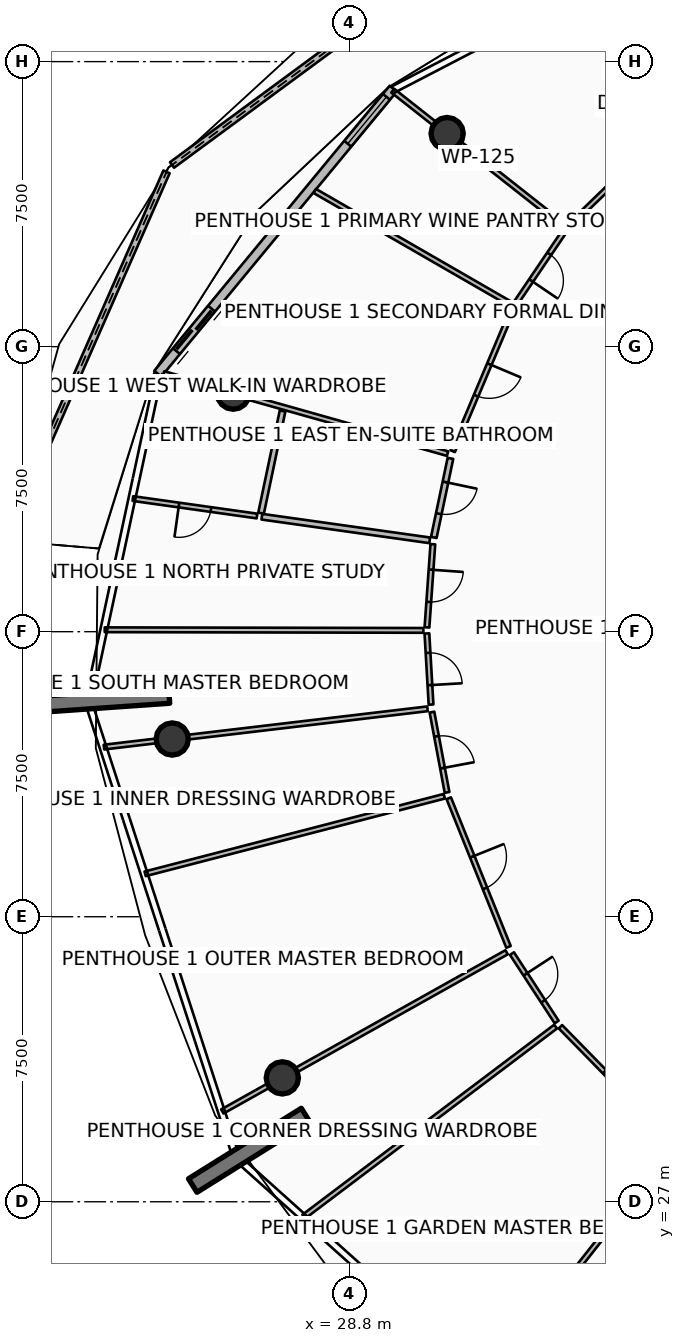
"""IFC4 building model, lengths in metres.
Left out: names, types, materials, properties, quantities, classifications, styles, units other than length and angle.
Written with IfcOpenShell. Run it as: python <this file> out.ifc"""

import sys

from ifc_helpers import new_model, si_unit, direction, frame, frame_2d, origin, origin_2d, place, context, subcontext, project, spatial, polyline, rectangle, circle, outline, extrude, element, fill, save


model = new_model("IFC4")
c1 = context("Model", 3, precision=1e-05, world=origin(), true_north=direction((0.0, 1.0)))
c2 = subcontext(c1, "Body", "Model", "MODEL_VIEW")
j1 = project(units=[si_unit("LENGTHUNIT", "METRE"), si_unit("PLANEANGLEUNIT", "RADIAN")], contexts=[c1])
p1 = place(None, origin())
s1 = spatial("IfcSite", under=j1, at=p1, CompositionType="ELEMENT")
p2 = place(p1, origin())
s2 = spatial("IfcBuilding", under=s1, at=p2, CompositionType="ELEMENT")
p3 = place(p2, frame((0.0, 0.0, 326.3)))
s3 = spatial("IfcBuildingStorey", under=s2, at=p3, CompositionType="ELEMENT", Elevation=326.3)
for number, where, z_axis, x_axis in (
    (1, (24.059, 40.326, 0.0), (0.0, 0.0, 1.0), (-0.998, -0.07, 0.0)),
    (2, (27.647, 29.282, 0.0), (0.0, 0.0, 1.0), (-0.848, -0.53, 0.0)),
):
    element("IfcWall", number, at=place(p3, frame(where, z_axis=z_axis, x_axis=x_axis)), inside=s3, PredefinedType="SOLIDWALL", context=c2, shape_type="SweptSolid", body=[
        extrude(rectangle(XDim=3.5, YDim=0.42, at=frame_2d((1.75, 0.0))), origin(), (0.0, 0.0, 1.0), 4.2),
    ])
for number, where, z_axis, x_axis in (
    (3, (31.374, 55.107, 0.0), (0.0, 0.0, 1.0), (1.0, 0.0, 0.0)),
    (4, (25.744, 48.277, 0.0), (0.0, 0.0, 1.0), (1.0, 0.0, 0.0)),
    (5, (24.14, 39.176, 0.0), (0.0, 0.0, 1.0), (1.0, 0.0, 0.0)),
    (6, (27.037, 30.26, 0.0), (0.0, 0.0, 1.0), (1.0, 0.0, 0.0)),
):
    element("IfcColumn", number, at=place(p3, frame(where, z_axis=z_axis, x_axis=x_axis)), inside=s3, PredefinedType="COLUMN", context=c2, shape_type="SweptSolid", body=[
        extrude(circle(Radius=0.425, at=origin_2d()), origin(), (0.0, 0.0, 1.0), 3.94),
    ])
p4 = place(p3, frame((32.227, 60.241, 0.0), z_axis=(0.0, 0.0, 1.0), x_axis=(-0.805132760075, -0.593094628752, 0.0)))
e7 = element("IfcWall", 7, at=p4, inside=s3, PredefinedType="PARAPET", context=c2, shape_type="SweptSolid", body=[
    extrude(outline(polyline([(0.0, 0.0), (10.051, 0.0), (10.051, 1.832), (5.025, 1.696), (0.0, 1.497), (0.0, 0.0)])), frame((0.0, 0.09, 0.0), z_axis=(0.0, -1.0, 0.0), x_axis=(1.0, 0.0, 0.0)), (0.0, 0.0, 1.0), 0.18),
])
p5 = place(p3, frame((23.99, 54.1, 0.0), z_axis=(0.0, 0.0, 1.0), x_axis=(-0.402276040411, -0.915518425435, 0.0)))
e8 = element("IfcWall", 8, at=p5, inside=s3, PredefinedType="PARAPET", context=c2, shape_type="SweptSolid", body=[
    extrude(outline(polyline([(0.0, 0.0), (10.596, 0.0), (10.596, 1.756), (5.298, 1.853), (0.0, 1.832), (0.0, 0.0)])), frame((0.0, 0.09, 0.0), z_axis=(0.0, -1.0, 0.0), x_axis=(1.0, 0.0, 0.0)), (0.0, 0.0, 1.0), 0.18),
])
p6 = place(p3, frame((29.955, 56.289, 0.0), z_axis=(0.0, 0.0, 1.0), x_axis=(-0.636803612721, -0.771026042897, 0.0)))
e9 = element("IfcWall", 9, at=p6, inside=s3, PredefinedType="SOLIDWALL", context=c2, shape_type="SweptSolid", body=[
    extrude(rectangle(XDim=9.728, YDim=0.24, at=frame_2d((4.864, 0.0))), origin(), (0.0, 0.0, 1.0), 2.89),
])
p7 = place(p6, frame((7.508, 0.0, 0.0)))
e10 = element("IfcOpeningElement", 10, at=p7, cuts=e9, PredefinedType="OPENING", context=c2, shape_type="SweptSolid", body=[
    extrude(rectangle(XDim=1.45, YDim=2.15, at=frame_2d((0.725, 1.075))), frame((0.0, 0.13, 0.0), z_axis=(0.0, -1.0, 0.0), x_axis=(1.0, 0.0, 0.0)), (0.0, 0.0, 1.0), 0.26),
])
p8 = place(p6, frame((0.28, 0.0, 0.65)))
e11 = element("IfcOpeningElement", 11, at=p8, cuts=e9, PredefinedType="OPENING", context=c2, shape_type="SweptSolid", body=[
    extrude(rectangle(XDim=1.6, YDim=1.5, at=frame_2d((0.8, 0.75))), frame((0.0, 0.13, 0.0), z_axis=(0.0, -1.0, 0.0), x_axis=(1.0, 0.0, 0.0)), (0.0, 0.0, 1.0), 0.26),
])
p9 = place(p3, frame((37.76, 55.886, 0.0), z_axis=(0.0, 0.0, 1.0), x_axis=(-0.593476725003, 0.804851152002, 0.0)))
e12 = element("IfcWall", 12, at=p9, inside=s3, PredefinedType="PARTITIONING", context=c2, shape_type="SweptSolid", body=[
    extrude(rectangle(XDim=3.958, YDim=0.15, at=frame_2d((1.979, 0.0))), origin(), (0.0, 0.0, 1.0), 3.38),
])
p10 = place(p3, frame((37.749, 55.751, 0.0), z_axis=(0.0, 0.0, 1.0), x_axis=(-0.718380815069, -0.695650058967, 0.0)))
e13 = element("IfcWall", 13, at=p10, inside=s3, PredefinedType="PARTITIONING", context=c2, shape_type="SweptSolid", body=[
    extrude(rectangle(XDim=4.393, YDim=0.125, at=frame_2d((2.196, 0.0))), origin(), (0.0, 0.0, 1.0), 3.38),
])
p11 = place(p10, frame((1.746, 0.0, 0.0)))
e14 = element("IfcOpeningElement", 14, at=p11, cuts=e13, PredefinedType="OPENING", context=c2, shape_type="SweptSolid", body=[
    extrude(rectangle(XDim=0.9, YDim=2.08, at=frame_2d((0.45, 1.04))), frame((0.0, 0.073, 0.0), z_axis=(0.0, -1.0, 0.0), x_axis=(1.0, 0.0, 0.0)), (0.0, 0.0, 1.0), 0.145),
])
p12 = place(p3, frame((34.443, 52.688, 0.0), z_axis=(0.0, 0.0, 1.0), x_axis=(-0.785329715116, 0.61907773224, 0.0)))
e15 = element("IfcWall", 15, at=p12, inside=s3, PredefinedType="PARTITIONING", context=c2, shape_type="SweptSolid", body=[
    extrude(rectangle(XDim=5.73, YDim=0.125, at=frame_2d((2.865, 0.0))), origin(), (0.0, 0.0, 1.0), 3.38),
])
p13 = place(p3, frame((33.054, 50.619, 0.0), z_axis=(0.0, 0.0, 1.0), x_axis=(-0.86627763932, 0.499562860524, 0.0)))
e16 = element("IfcWall", 16, at=p13, inside=s3, PredefinedType="PARTITIONING", context=c2, shape_type="SweptSolid", body=[
    extrude(rectangle(XDim=5.96, YDim=0.125, at=frame_2d((2.98, 0.0))), origin(), (0.0, 0.0, 1.0), 3.38),
])
p14 = place(p3, frame((34.466, 52.543, 0.0), z_axis=(0.0, 0.0, 1.0), x_axis=(-0.560789421623, -0.827958467917, 0.0)))
e17 = element("IfcWall", 17, at=p14, inside=s3, PredefinedType="PARTITIONING", context=c2, shape_type="SweptSolid", body=[
    extrude(rectangle(XDim=2.298, YDim=0.125, at=frame_2d((1.149, 0.0))), origin(), (0.0, 0.0, 1.0), 3.38),
])
p15 = place(p14, frame((0.724, 0.0, 0.0)))
e18 = element("IfcOpeningElement", 18, at=p15, cuts=e17, PredefinedType="OPENING", context=c2, shape_type="SweptSolid", body=[
    extrude(rectangle(XDim=0.85, YDim=2.06, at=frame_2d((0.425, 1.03))), frame((0.0, 0.073, 0.0), z_axis=(0.0, -1.0, 0.0), x_axis=(1.0, 0.0, 0.0)), (0.0, 0.0, 1.0), 0.145),
])
p16 = place(p3, frame((33.101, 50.5, 0.0), z_axis=(0.0, 0.0, 1.0), x_axis=(-0.388459336045, -0.921465867105, 0.0)))
e19 = element("IfcWall", 19, at=p16, inside=s3, PredefinedType="PARTITIONING", context=c2, shape_type="SweptSolid", body=[
    extrude(rectangle(XDim=4.069, YDim=0.125, at=frame_2d((2.034, 0.0))), origin(), (0.0, 0.0, 1.0), 3.38),
])
p17 = place(p16, frame((1.584, 0.0, 0.0)))
e20 = element("IfcOpeningElement", 20, at=p17, cuts=e19, PredefinedType="OPENING", context=c2, shape_type="SweptSolid", body=[
    extrude(rectangle(XDim=0.9, YDim=2.08, at=frame_2d((0.45, 1.04))), frame((0.0, 0.073, 0.0), z_axis=(0.0, -1.0, 0.0), x_axis=(1.0, 0.0, 0.0)), (0.0, 0.0, 1.0), 0.145),
])
p18 = place(p3, frame((31.385, 46.686, 0.0), z_axis=(0.0, 0.0, 1.0), x_axis=(-0.962455784847, 0.271438505401, 0.0)))
e21 = element("IfcWall", 21, at=p18, inside=s3, PredefinedType="PARTITIONING", context=c2, shape_type="SweptSolid", body=[
    extrude(rectangle(XDim=7.764, YDim=0.125, at=frame_2d((3.882, 0.0))), origin(), (0.0, 0.0, 1.0), 3.38),
])
p19 = place(p3, frame((31.461, 46.561, 0.0), z_axis=(0.0, 0.0, 1.0), x_axis=(-0.20584268828, -0.978585094758, 0.0)))
e22 = element("IfcWall", 22, at=p19, inside=s3, PredefinedType="PARTITIONING", context=c2, shape_type="SweptSolid", body=[
    extrude(rectangle(XDim=2.127, YDim=0.15, at=frame_2d((1.063, 0.0))), origin(), (0.0, 0.0, 1.0), 3.38),
])
p20 = place(p19, frame((0.638, 0.0, 0.0)))
e23 = element("IfcOpeningElement", 23, at=p20, cuts=e22, PredefinedType="OPENING", context=c2, shape_type="SweptSolid", body=[
    extrude(rectangle(XDim=0.85, YDim=2.06, at=frame_2d((0.425, 1.03))), frame((0.0, 0.085, 0.0), z_axis=(0.0, -1.0, 0.0), x_axis=(1.0, 0.0, 0.0)), (0.0, 0.0, 1.0), 0.17),
])
p21 = place(p3, frame((27.043, 47.807, 0.0), z_axis=(0.0, 0.0, 1.0), x_axis=(-0.205902945386, -0.978572417903, 0.0)))
e24 = element("IfcWall", 24, at=p21, inside=s3, PredefinedType="PARTITIONING", context=c2, shape_type="SweptSolid", body=[
    extrude(rectangle(XDim=2.746, YDim=0.15, at=frame_2d((1.373, 0.0))), origin(), (0.0, 0.0, 1.0), 3.38),
])
p22 = place(p3, frame((30.915, 44.404, 0.0), z_axis=(0.0, 0.0, 1.0), x_axis=(-0.990240767804, 0.139367219172, 0.0)))
e25 = element("IfcWall", 25, at=p22, inside=s3, PredefinedType="PARTITIONING", context=c2, shape_type="SweptSolid", body=[
    extrude(rectangle(XDim=4.46, YDim=0.15, at=frame_2d((2.23, 0.0))), origin(), (0.0, 0.0, 1.0), 3.38),
])
p23 = place(p3, frame((26.37, 45.044, 0.0), z_axis=(0.0, 0.0, 1.0), x_axis=(-0.990243492516, 0.139347858002, 0.0)))
e26 = element("IfcWall", 26, at=p23, inside=s3, PredefinedType="PARTITIONING", context=c2, shape_type="SweptSolid", body=[
    extrude(rectangle(XDim=3.297, YDim=0.125, at=frame_2d((1.649, 0.0))), origin(), (0.0, 0.0, 1.0), 3.38),
])
p24 = place(p23, frame((1.224, 0.0, 0.0)))
e27 = element("IfcOpeningElement", 27, at=p24, cuts=e26, PredefinedType="OPENING", context=c2, shape_type="SweptSolid", body=[
    extrude(rectangle(XDim=0.85, YDim=2.06, at=frame_2d((0.425, 1.03))), frame((0.0, 0.073, 0.0), z_axis=(0.0, -1.0, 0.0), x_axis=(1.0, 0.0, 0.0)), (0.0, 0.0, 1.0), 0.145),
])
p25 = place(p3, frame((30.747, 42.034, 0.0), z_axis=(0.0, 0.0, 1.0), x_axis=(-0.999998039071, 0.001980367145, 0.0)))
e28 = element("IfcWall", 28, at=p25, inside=s3, PredefinedType="PARTITIONING", context=c2, shape_type="SweptSolid", body=[
    extrude(rectangle(XDim=8.383, YDim=0.125, at=frame_2d((4.191, 0.0))), origin(), (0.0, 0.0, 1.0), 3.38),
])
p26 = place(p3, frame((30.998, 44.302, 0.0), z_axis=(0.0, 0.0, 1.0), x_axis=(-0.070788273512, -0.997491363538, 0.0)))
e29 = element("IfcWall", 29, at=p26, inside=s3, PredefinedType="PARTITIONING", context=c2, shape_type="SweptSolid", body=[
    extrude(rectangle(XDim=2.194, YDim=0.125, at=frame_2d((1.097, 0.0))), origin(), (0.0, 0.0, 1.0), 3.38),
])
p27 = place(p26, frame((0.672, 0.0, 0.0)))
e30 = element("IfcOpeningElement", 30, at=p27, cuts=e29, PredefinedType="OPENING", context=c2, shape_type="SweptSolid", body=[
    extrude(rectangle(XDim=0.85, YDim=2.06, at=frame_2d((0.425, 1.03))), frame((0.0, 0.073, 0.0), z_axis=(0.0, -1.0, 0.0), x_axis=(1.0, 0.0, 0.0)), (0.0, 0.0, 1.0), 0.145),
])
p28 = place(p3, frame((30.842, 41.954, 0.0), z_axis=(0.0, 0.0, 1.0), x_axis=(0.057950971365, -0.998319430302, 0.0)))
e31 = element("IfcWall", 31, at=p28, inside=s3, PredefinedType="PARTITIONING", context=c2, shape_type="SweptSolid", body=[
    extrude(rectangle(XDim=1.875, YDim=0.125, at=frame_2d((0.938, 0.0))), origin(), (0.0, 0.0, 1.0), 3.38),
])
p29 = place(p28, frame((0.512, 0.0, 0.0)))
e32 = element("IfcOpeningElement", 32, at=p29, cuts=e31, PredefinedType="OPENING", context=c2, shape_type="SweptSolid", body=[
    extrude(rectangle(XDim=0.85, YDim=2.06, at=frame_2d((0.425, 1.03))), frame((0.0, 0.073, 0.0), z_axis=(0.0, -1.0, 0.0), x_axis=(1.0, 0.0, 0.0)), (0.0, 0.0, 1.0), 0.145),
])
p30 = place(p3, frame((30.857, 39.971, 0.0), z_axis=(0.0, 0.0, 1.0), x_axis=(-0.993069304007, -0.117530240533, 0.0)))
e33 = element("IfcWall", 33, at=p30, inside=s3, PredefinedType="PARTITIONING", context=c2, shape_type="SweptSolid", body=[
    extrude(rectangle(XDim=8.573, YDim=0.125, at=frame_2d((4.286, 0.0))), origin(), (0.0, 0.0, 1.0), 3.38),
])
p31 = place(p3, frame((31.299, 37.67, 0.0), z_axis=(0.0, 0.0, 1.0), x_axis=(-0.967993656755, -0.250974661037, 0.0)))
e34 = element("IfcWall", 34, at=p31, inside=s3, PredefinedType="PARTITIONING", context=c2, shape_type="SweptSolid", body=[
    extrude(rectangle(XDim=8.132, YDim=0.125, at=frame_2d((4.066, 0.0))), origin(), (0.0, 0.0, 1.0), 3.38),
])
p32 = place(p3, frame((30.975, 39.885, 0.0), z_axis=(0.0, 0.0, 1.0), x_axis=(0.184617579239, -0.982810434131, 0.0)))
e35 = element("IfcWall", 35, at=p32, inside=s3, PredefinedType="PARTITIONING", context=c2, shape_type="SweptSolid", body=[
    extrude(rectangle(XDim=2.15, YDim=0.125, at=frame_2d((1.075, 0.0))), origin(), (0.0, 0.0, 1.0), 3.38),
])
p33 = place(p32, frame((0.65, 0.0, 0.0)))
e36 = element("IfcOpeningElement", 36, at=p33, cuts=e35, PredefinedType="OPENING", context=c2, shape_type="SweptSolid", body=[
    extrude(rectangle(XDim=0.85, YDim=2.06, at=frame_2d((0.425, 1.03))), frame((0.0, 0.073, 0.0), z_axis=(0.0, -1.0, 0.0), x_axis=(1.0, 0.0, 0.0)), (0.0, 0.0, 1.0), 0.145),
])
p34 = place(p3, frame((31.416, 37.618, 0.0), z_axis=(0.0, 0.0, 1.0), x_axis=(0.37287786912, -0.927880431263, 0.0)))
e37 = element("IfcWall", 37, at=p34, inside=s3, PredefinedType="PARTITIONING", context=c2, shape_type="SweptSolid", body=[
    extrude(rectangle(XDim=4.216, YDim=0.125, at=frame_2d((2.108, 0.0))), origin(), (0.0, 0.0, 1.0), 3.38),
])
p35 = place(p34, frame((1.658, 0.0, 0.0)))
e38 = element("IfcOpeningElement", 38, at=p35, cuts=e37, PredefinedType="OPENING", context=c2, shape_type="SweptSolid", body=[
    extrude(rectangle(XDim=0.9, YDim=2.08, at=frame_2d((0.45, 1.04))), frame((0.0, 0.073, 0.0), z_axis=(0.0, -1.0, 0.0), x_axis=(1.0, 0.0, 0.0)), (0.0, 0.0, 1.0), 0.145),
])
p36 = place(p3, frame((32.938, 33.565, 0.0), z_axis=(0.0, 0.0, 1.0), x_axis=(-0.87250261652, -0.488609439293, 0.0)))
e39 = element("IfcWall", 39, at=p36, inside=s3, PredefinedType="PARTITIONING", context=c2, shape_type="SweptSolid", body=[
    extrude(rectangle(XDim=8.573, YDim=0.125, at=frame_2d((4.286, 0.0))), origin(), (0.0, 0.0, 1.0), 3.38),
])
p37 = place(p3, frame((37.312, 28.443, 0.0), z_axis=(0.0, 0.0, 1.0), x_axis=(-0.619079427556, -0.78532837869, 0.0)))
e40 = element("IfcWall", 40, at=p37, inside=s3, PredefinedType="PARTITIONING", context=c2, shape_type="SweptSolid", body=[
    extrude(rectangle(XDim=7.864, YDim=0.125, at=frame_2d((3.932, 0.0))), origin(), (0.0, 0.0, 1.0), 3.38),
])
p38 = place(p3, frame((34.228, 31.608, 0.0), z_axis=(0.0, 0.0, 1.0), x_axis=(-0.798277484709, -0.602289845014, 0.0)))
e41 = element("IfcWall", 41, at=p38, inside=s3, PredefinedType="PARTITIONING", context=c2, shape_type="SweptSolid", body=[
    extrude(rectangle(XDim=8.299, YDim=0.125, at=frame_2d((4.149, 0.0))), origin(), (0.0, 0.0, 1.0), 3.38),
])
p39 = place(p3, frame((33.08, 33.53, 0.0), z_axis=(0.0, 0.0, 1.0), x_axis=(0.546735291737, -0.837305512205, 0.0)))
e42 = element("IfcWall", 42, at=p39, inside=s3, PredefinedType="PARTITIONING", context=c2, shape_type="SweptSolid", body=[
    extrude(rectangle(XDim=2.15, YDim=0.125, at=frame_2d((1.075, 0.0))), origin(), (0.0, 0.0, 1.0), 3.38),
])
p40 = place(p39, frame((0.65, 0.0, 0.0)))
e43 = element("IfcOpeningElement", 43, at=p40, cuts=e42, PredefinedType="OPENING", context=c2, shape_type="SweptSolid", body=[
    extrude(rectangle(XDim=0.85, YDim=2.06, at=frame_2d((0.425, 1.03))), frame((0.0, 0.073, 0.0), z_axis=(0.0, -1.0, 0.0), x_axis=(1.0, 0.0, 0.0)), (0.0, 0.0, 1.0), 0.145),
])
p41 = place(p3, frame((34.355, 31.605, 0.0), z_axis=(0.0, 0.0, 1.0), x_axis=(0.699567507915, -0.714566513258, 0.0)))
e44 = element("IfcWall", 44, at=p41, inside=s3, PredefinedType="PARTITIONING", context=c2, shape_type="SweptSolid", body=[
    extrude(rectangle(XDim=4.216, YDim=0.125, at=frame_2d((2.108, 0.0))), origin(), (0.0, 0.0, 1.0), 3.38),
])
p42 = place(p41, frame((1.658, 0.0, 0.0)))
e45 = element("IfcOpeningElement", 45, at=p42, cuts=e44, PredefinedType="OPENING", context=c2, shape_type="SweptSolid", body=[
    extrude(rectangle(XDim=0.9, YDim=2.08, at=frame_2d((0.45, 1.04))), frame((0.0, 0.073, 0.0), z_axis=(0.0, -1.0, 0.0), x_axis=(1.0, 0.0, 0.0)), (0.0, 0.0, 1.0), 0.145),
])
p43 = place(p7, origin())
e46 = element("IfcDoor", 46, at=p43, inside=s3, OperationType="DOUBLE_DOOR_SLIDING", PredefinedType="DOOR", context=c2, shape_type="SweptSolid", body=[
    extrude(rectangle(XDim=1.45, YDim=2.15, at=frame_2d((0.725, 1.075))), frame((0.0, 0.025, 0.0), z_axis=(0.0, -1.0, 0.0), x_axis=(1.0, 0.0, 0.0)), (0.0, 0.0, 1.0), 0.05),
])
fill(e10, e46)
p44 = place(p8, origin())
e47 = element("IfcWindow", 47, at=p44, inside=s3, PartitioningType="SINGLE_PANEL", PredefinedType="WINDOW", context=c2, shape_type="SweptSolid", body=[
    extrude(rectangle(XDim=1.6, YDim=1.5, at=frame_2d((0.8, 0.75))), frame((0.0, 0.03, 0.0), z_axis=(0.0, -1.0, 0.0), x_axis=(1.0, 0.0, 0.0)), (0.0, 0.0, 1.0), 0.06),
])
fill(e11, e47)
p45 = place(p15, origin())
e48 = element("IfcDoor", 48, at=p45, inside=s3, OperationType="SINGLE_SWING_RIGHT", PredefinedType="DOOR", context=c2, shape_type="SweptSolid", body=[
    extrude(rectangle(XDim=0.85, YDim=2.06, at=frame_2d((0.425, 1.03))), frame((0.0, 0.025, 0.0), z_axis=(0.0, -1.0, 0.0), x_axis=(1.0, 0.0, 0.0)), (0.0, 0.0, 1.0), 0.05),
])
fill(e18, e48)
p46 = place(p17, origin())
e49 = element("IfcDoor", 49, at=p46, inside=s3, OperationType="SINGLE_SWING_LEFT", PredefinedType="DOOR", context=c2, shape_type="SweptSolid", body=[
    extrude(rectangle(XDim=0.9, YDim=2.08, at=frame_2d((0.45, 1.04))), frame((0.0, 0.025, 0.0), z_axis=(0.0, -1.0, 0.0), x_axis=(1.0, 0.0, 0.0)), (0.0, 0.0, 1.0), 0.05),
])
fill(e20, e49)
p47 = place(p20, origin())
e50 = element("IfcDoor", 50, at=p47, inside=s3, OperationType="SINGLE_SWING_LEFT", PredefinedType="DOOR", context=c2, shape_type="SweptSolid", body=[
    extrude(rectangle(XDim=0.85, YDim=2.06, at=frame_2d((0.425, 1.03))), frame((0.0, 0.025, 0.0), z_axis=(0.0, -1.0, 0.0), x_axis=(1.0, 0.0, 0.0)), (0.0, 0.0, 1.0), 0.05),
])
fill(e23, e50)
p48 = place(p24, origin())
e51 = element("IfcDoor", 51, at=p48, inside=s3, OperationType="SINGLE_SWING_RIGHT", PredefinedType="DOOR", context=c2, shape_type="SweptSolid", body=[
    extrude(rectangle(XDim=0.85, YDim=2.06, at=frame_2d((0.425, 1.03))), frame((0.0, 0.025, 0.0), z_axis=(0.0, -1.0, 0.0), x_axis=(1.0, 0.0, 0.0)), (0.0, 0.0, 1.0), 0.05),
])
fill(e27, e51)
p49 = place(p27, origin())
e52 = element("IfcDoor", 52, at=p49, inside=s3, OperationType="SINGLE_SWING_LEFT", PredefinedType="DOOR", context=c2, shape_type="SweptSolid", body=[
    extrude(rectangle(XDim=0.85, YDim=2.06, at=frame_2d((0.425, 1.03))), frame((0.0, 0.025, 0.0), z_axis=(0.0, -1.0, 0.0), x_axis=(1.0, 0.0, 0.0)), (0.0, 0.0, 1.0), 0.05),
])
fill(e30, e52)
p50 = place(p29, origin())
e53 = element("IfcDoor", 53, at=p50, inside=s3, OperationType="SINGLE_SWING_RIGHT", PredefinedType="DOOR", context=c2, shape_type="SweptSolid", body=[
    extrude(rectangle(XDim=0.85, YDim=2.06, at=frame_2d((0.425, 1.03))), frame((0.0, 0.025, 0.0), z_axis=(0.0, -1.0, 0.0), x_axis=(1.0, 0.0, 0.0)), (0.0, 0.0, 1.0), 0.05),
])
fill(e32, e53)
p51 = place(p33, origin())
e54 = element("IfcDoor", 54, at=p51, inside=s3, OperationType="SINGLE_SWING_RIGHT", PredefinedType="DOOR", context=c2, shape_type="SweptSolid", body=[
    extrude(rectangle(XDim=0.85, YDim=2.06, at=frame_2d((0.425, 1.03))), frame((0.0, 0.025, 0.0), z_axis=(0.0, -1.0, 0.0), x_axis=(1.0, 0.0, 0.0)), (0.0, 0.0, 1.0), 0.05),
])
fill(e36, e54)
p52 = place(p35, origin())
e55 = element("IfcDoor", 55, at=p52, inside=s3, OperationType="SINGLE_SWING_LEFT", PredefinedType="DOOR", context=c2, shape_type="SweptSolid", body=[
    extrude(rectangle(XDim=0.9, YDim=2.08, at=frame_2d((0.45, 1.04))), frame((0.0, 0.025, 0.0), z_axis=(0.0, -1.0, 0.0), x_axis=(1.0, 0.0, 0.0)), (0.0, 0.0, 1.0), 0.05),
])
fill(e38, e55)
p53 = place(p40, origin())
e56 = element("IfcDoor", 56, at=p53, inside=s3, OperationType="SINGLE_SWING_LEFT", PredefinedType="DOOR", context=c2, shape_type="SweptSolid", body=[
    extrude(rectangle(XDim=0.85, YDim=2.06, at=frame_2d((0.425, 1.03))), frame((0.0, 0.025, 0.0), z_axis=(0.0, -1.0, 0.0), x_axis=(1.0, 0.0, 0.0)), (0.0, 0.0, 1.0), 0.05),
])
fill(e43, e56)
p54 = place(p42, origin())
e57 = element("IfcDoor", 57, at=p54, inside=s3, OperationType="SINGLE_SWING_RIGHT", PredefinedType="DOOR", context=c2, shape_type="SweptSolid", body=[
    extrude(rectangle(XDim=0.9, YDim=2.08, at=frame_2d((0.45, 1.04))), frame((0.0, 0.025, 0.0), z_axis=(0.0, -1.0, 0.0), x_axis=(1.0, 0.0, 0.0)), (0.0, 0.0, 1.0), 0.05),
])
fill(e45, e57)
save(model, sys.argv[1])
